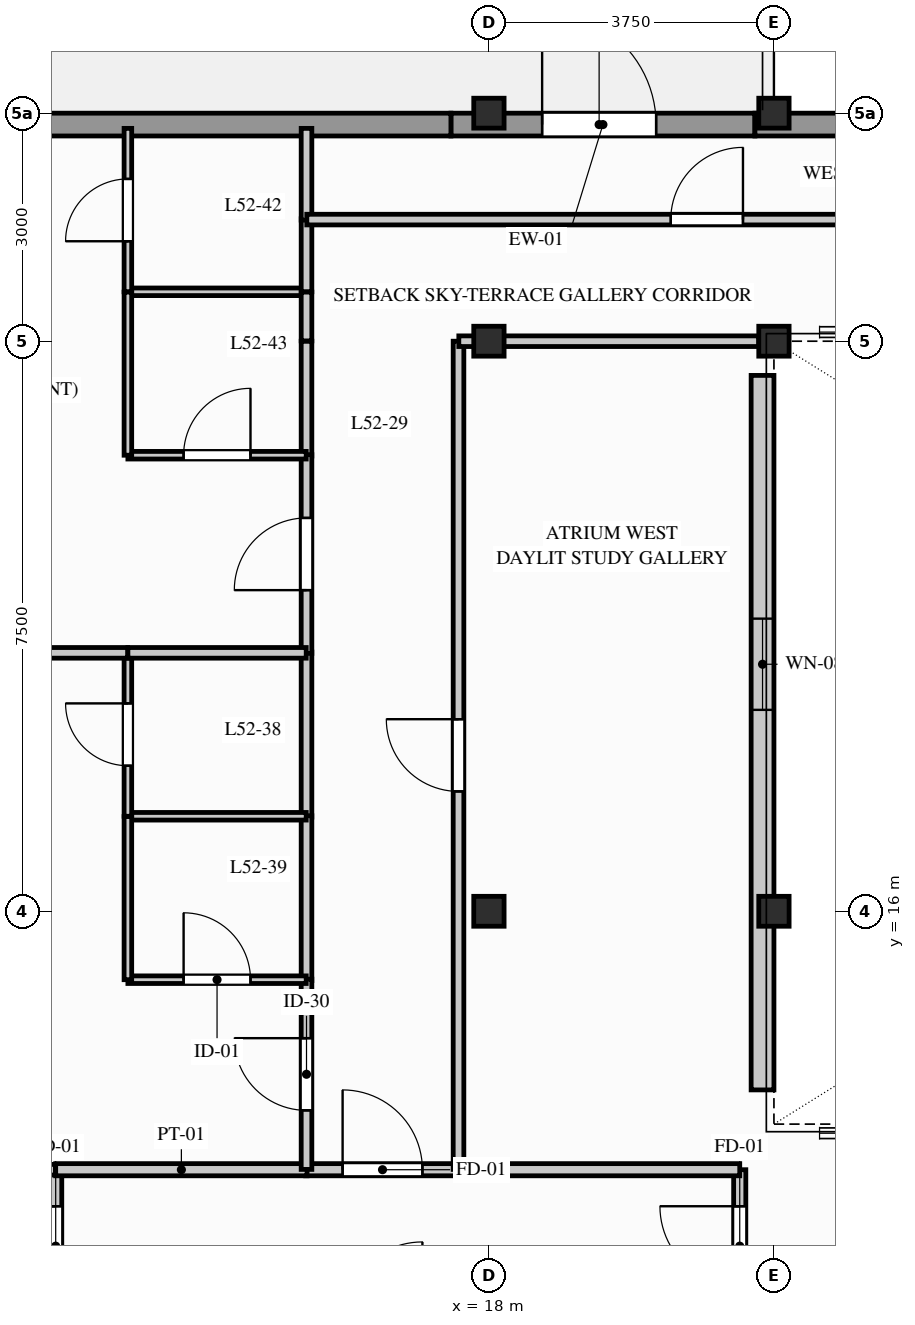
"""IFC4 building model, lengths in metres.
Left out: names, types, materials, properties, quantities, classifications, styles, units other than length and angle.
Written with IfcOpenShell. Run it as: python <this file> out.ifc"""

import sys

from ifc_helpers import new_model, si_unit, direction, frame, frame_2d, origin, origin_2d, place, context, subcontext, project, spatial, rectangle, i_section, extrude, element, fill, save


model = new_model("IFC4")
c1 = context("Model", 3, precision=1e-05, world=origin(), true_north=direction((0.0, 1.0)))
c2 = subcontext(c1, "Body", "Model", "MODEL_VIEW")
j1 = project(units=[si_unit("LENGTHUNIT", "METRE"), si_unit("PLANEANGLEUNIT", "RADIAN")], contexts=[c1])
p1 = place(None, origin())
s1 = spatial("IfcSite", under=j1, at=p1, CompositionType="ELEMENT")
p2 = place(p1, origin())
s2 = spatial("IfcBuilding", under=s1, at=p2, CompositionType="ELEMENT")
p3 = place(p2, frame((0.0, 0.0, 172.8)))
s3 = spatial("IfcBuildingStorey", under=s2, at=p3, CompositionType="ELEMENT", Elevation=172.8)
for number, where, z_axis, x_axis in (
    (1, (18.0, 16.0, 0.0), (0.0, 0.0, 1.0), (1.0, 0.0, 0.0)),
    (2, (18.0, 23.5, 0.0), (0.0, 0.0, 1.0), (1.0, 0.0, 0.0)),
    (3, (18.0, 26.5, 0.0), (0.0, 0.0, 1.0), (1.0, 0.0, 0.0)),
    (4, (21.75, 16.0, 0.0), (0.0, 0.0, 1.0), (1.0, 0.0, 0.0)),
    (5, (21.75, 23.5, 0.0), (0.0, 0.0, 1.0), (1.0, 0.0, 0.0)),
    (6, (21.75, 26.5, 0.0), (0.0, 0.0, 1.0), (1.0, 0.0, 0.0)),
):
    element("IfcColumn", number, at=place(p3, frame(where, z_axis=z_axis, x_axis=x_axis)), inside=s3, PredefinedType="COLUMN", context=c2, shape_type="SweptSolid", body=[
        extrude(i_section(OverallWidth=0.399, OverallDepth=0.394, WebThickness=0.023, FlangeThickness=0.037, FilletRadius=0.015, at=origin_2d()), origin(), (0.0, 0.0, 1.0), 3.1),
    ])
p4 = place(p3, frame((17.5, 26.35, 0.0), z_axis=(0.0, 0.0, 1.0), x_axis=(1.0, 0.0, 0.0)))
e7 = element("IfcWall", 7, at=p4, inside=s3, PredefinedType="STANDARD", context=c2, shape_type="SweptSolid", body=[
    extrude(rectangle(XDim=4.0, YDim=0.3, at=frame_2d((2.0, 0.0))), origin(), (0.0, 0.0, 1.0), 2.332),
])
p5 = place(p4, frame((1.2, 0.0, 0.0)))
e8 = element("IfcOpeningElement", 8, at=p5, cuts=e7, PredefinedType="OPENING", context=c2, shape_type="SweptSolid", body=[
    extrude(rectangle(XDim=1.5, YDim=2.2, at=frame_2d((0.75, 1.1))), frame((0.0, 0.16, 0.0), z_axis=(0.0, -1.0, 0.0), x_axis=(1.0, 0.0, 0.0)), (0.0, 0.0, 1.0), 0.32),
])
p6 = place(p3, frame((11.45, 26.35, 0.0), z_axis=(0.0, 0.0, 1.0), x_axis=(1.0, 0.0, 0.0)))
e9 = element("IfcWall", 9, at=p6, inside=s3, PredefinedType="STANDARD", context=c2, shape_type="SweptSolid", body=[
    extrude(rectangle(XDim=6.05, YDim=0.3, at=frame_2d((3.025, 0.0))), origin(), (0.0, 0.0, 1.0), 2.332),
])
p7 = place(p3, frame((21.5, 26.35, 0.0), z_axis=(0.0, 0.0, 1.0), x_axis=(1.0, 0.0, 0.0)))
e10 = element("IfcWall", 10, at=p7, inside=s3, PredefinedType="STANDARD", context=c2, shape_type="SweptSolid", body=[
    extrude(rectangle(XDim=6.3, YDim=0.3, at=frame_2d((3.15, 0.0))), origin(), (0.0, 0.0, 1.0), 2.332),
])
p8 = place(p3, frame((21.6, 23.05, 0.0), z_axis=(0.0, 0.0, 1.0), x_axis=(0.0, -1.0, 0.0)))
e11 = element("IfcWall", 11, at=p8, inside=s3, PredefinedType="STANDARD", context=c2, shape_type="SweptSolid", body=[
    extrude(rectangle(XDim=9.4, YDim=0.3, at=frame_2d((4.7, 0.0))), origin(), (0.0, 0.0, 1.0), 2.253),
])
p9 = place(p8, frame((3.2, 0.0, 0.433)))
e12 = element("IfcOpeningElement", 12, at=p9, cuts=e11, PredefinedType="OPENING", context=c2, shape_type="SweptSolid", body=[
    extrude(rectangle(XDim=1.2, YDim=1.6, at=frame_2d((0.6, 0.8))), frame((0.0, 0.16, 0.0), z_axis=(0.0, -1.0, 0.0), x_axis=(1.0, 0.0, 0.0)), (0.0, 0.0, 1.0), 0.32),
])
p10 = place(p3, frame((21.3, 10.589, 0.0), z_axis=(0.0, 0.0, 1.0), x_axis=(0.0, 1.0, 0.0)))
e13 = element("IfcWall", 13, at=p10, inside=s3, PredefinedType="PARTITIONING", context=c2, shape_type="SweptSolid", body=[
    extrude(rectangle(XDim=2.011, YDim=0.16, at=frame_2d((1.006, 0.0))), origin(), (0.0, 0.0, 1.0), 2.89),
])
p11 = place(p10, frame((0.481, 0.0, 0.0)))
e14 = element("IfcOpeningElement", 14, at=p11, cuts=e13, PredefinedType="OPENING", context=c2, shape_type="SweptSolid", body=[
    extrude(rectangle(XDim=1.05, YDim=2.06, at=frame_2d((0.525, 1.03))), frame((0.0, 0.09, 0.0), z_axis=(0.0, -1.0, 0.0), x_axis=(1.0, 0.0, 0.0)), (0.0, 0.0, 1.0), 0.18),
])
p12 = place(p3, frame((15.589, 12.6, 0.0), z_axis=(0.0, 0.0, 1.0), x_axis=(1.0, 0.0, 0.0)))
e15 = element("IfcWall", 15, at=p12, inside=s3, PredefinedType="PARTITIONING", context=c2, shape_type="SweptSolid", body=[
    extrude(rectangle(XDim=2.023, YDim=0.16, at=frame_2d((1.011, 0.0))), origin(), (0.0, 0.0, 1.0), 2.89),
])
p13 = place(p12, frame((0.486, 0.0, 0.0)))
e16 = element("IfcOpeningElement", 16, at=p13, cuts=e15, PredefinedType="OPENING", context=c2, shape_type="SweptSolid", body=[
    extrude(rectangle(XDim=1.05, YDim=2.06, at=frame_2d((0.525, 1.03))), frame((0.0, 0.09, 0.0), z_axis=(0.0, -1.0, 0.0), x_axis=(1.0, 0.0, 0.0)), (0.0, 0.0, 1.0), 0.18),
])
p14 = place(p3, frame((12.3, 10.589, 0.0), z_axis=(0.0, 0.0, 1.0), x_axis=(0.0, 1.0, 0.0)))
e17 = element("IfcWall", 17, at=p14, inside=s3, PredefinedType="PARTITIONING", context=c2, shape_type="SweptSolid", body=[
    extrude(rectangle(XDim=2.011, YDim=0.16, at=frame_2d((1.006, 0.0))), origin(), (0.0, 0.0, 1.0), 2.89),
])
p15 = place(p14, frame((0.481, 0.0, 0.0)))
e18 = element("IfcOpeningElement", 18, at=p15, cuts=e17, PredefinedType="OPENING", context=c2, shape_type="SweptSolid", body=[
    extrude(rectangle(XDim=1.05, YDim=2.06, at=frame_2d((0.525, 1.03))), frame((0.0, 0.09, 0.0), z_axis=(0.0, -1.0, 0.0), x_axis=(1.0, 0.0, 0.0)), (0.0, 0.0, 1.0), 0.18),
])
p16 = place(p3, frame((12.3, 12.6, 0.0), z_axis=(0.0, 0.0, 1.0), x_axis=(1.0, 0.0, 0.0)))
e19 = element("IfcWall", 19, at=p16, inside=s3, PredefinedType="PARTITIONING", context=c2, shape_type="SweptSolid", body=[
    extrude(rectangle(XDim=3.307, YDim=0.16, at=frame_2d((1.654, 0.0))), origin(), (0.0, 0.0, 1.0), 2.89),
])
p17 = place(p3, frame((17.593, 12.6, 0.0), z_axis=(0.0, 0.0, 1.0), x_axis=(1.0, 0.0, 0.0)))
e20 = element("IfcWall", 20, at=p17, inside=s3, PredefinedType="PARTITIONING", context=c2, shape_type="SweptSolid", body=[
    extrude(rectangle(XDim=3.707, YDim=0.16, at=frame_2d((1.854, 0.0))), origin(), (0.0, 0.0, 1.0), 2.253),
])
p18 = place(p3, frame((15.6, 17.239, 0.0), z_axis=(0.0, 0.0, 1.0), x_axis=(0.0, 1.0, 0.0)))
e21 = element("IfcWall", 21, at=p18, inside=s3, PredefinedType="PARTITIONING", context=c2, shape_type="SweptSolid", body=[
    extrude(rectangle(XDim=2.173, YDim=0.14, at=frame_2d((1.086, 0.0))), origin(), (0.0, 0.0, 1.0), 2.89),
])
p19 = place(p3, frame((15.6, 15.089, 0.0), z_axis=(0.0, 0.0, 1.0), x_axis=(0.0, 1.0, 0.0)))
e22 = element("IfcWall", 22, at=p19, inside=s3, PredefinedType="PARTITIONING", context=c2, shape_type="SweptSolid", body=[
    extrude(rectangle(XDim=2.169, YDim=0.14, at=frame_2d((1.084, 0.0))), origin(), (0.0, 0.0, 1.0), 2.253),
])
p20 = place(p3, frame((15.6, 12.604, 0.0), z_axis=(0.0, 0.0, 1.0), x_axis=(0.0, 1.0, 0.0)))
e23 = element("IfcWall", 23, at=p20, inside=s3, PredefinedType="PARTITIONING", context=c2, shape_type="SweptSolid", body=[
    extrude(rectangle(XDim=2.503, YDim=0.14, at=frame_2d((1.252, 0.0))), origin(), (0.0, 0.0, 1.0), 2.89),
])
p21 = place(p20, frame((0.777, 0.0, 0.0)))
e24 = element("IfcOpeningElement", 24, at=p21, cuts=e23, PredefinedType="OPENING", context=c2, shape_type="SweptSolid", body=[
    extrude(rectangle(XDim=0.95, YDim=2.05, at=frame_2d((0.475, 1.025))), frame((0.0, 0.08, 0.0), z_axis=(0.0, -1.0, 0.0), x_axis=(1.0, 0.0, 0.0)), (0.0, 0.0, 1.0), 0.16),
])
p22 = place(p3, frame((15.6, 21.989, 0.0), z_axis=(0.0, 0.0, 1.0), x_axis=(0.0, 1.0, 0.0)))
e25 = element("IfcWall", 25, at=p22, inside=s3, PredefinedType="PARTITIONING", context=c2, shape_type="SweptSolid", body=[
    extrude(rectangle(XDim=1.511, YDim=0.14, at=frame_2d((0.756, 0.0))), origin(), (0.0, 0.0, 1.0), 2.253),
])
p23 = place(p3, frame((15.6, 19.393, 0.0), z_axis=(0.0, 0.0, 1.0), x_axis=(0.0, 1.0, 0.0)))
e26 = element("IfcWall", 26, at=p23, inside=s3, PredefinedType="PARTITIONING", context=c2, shape_type="SweptSolid", body=[
    extrude(rectangle(XDim=2.615, YDim=0.14, at=frame_2d((1.307, 0.0))), origin(), (0.0, 0.0, 1.0), 2.562),
])
p24 = place(p23, frame((0.832, 0.0, 0.0)))
e27 = element("IfcOpeningElement", 27, at=p24, cuts=e26, PredefinedType="OPENING", context=c2, shape_type="SweptSolid", body=[
    extrude(rectangle(XDim=0.95, YDim=2.05, at=frame_2d((0.475, 1.025))), frame((0.0, 0.08, 0.0), z_axis=(0.0, -1.0, 0.0), x_axis=(1.0, 0.0, 0.0)), (0.0, 0.0, 1.0), 0.16),
])
p25 = place(p3, frame((17.6, 12.604, 0.0), z_axis=(0.0, 0.0, 1.0), x_axis=(0.0, 1.0, 0.0)))
e28 = element("IfcWall", 28, at=p25, inside=s3, PredefinedType="PARTITIONING", context=c2, shape_type="SweptSolid", body=[
    extrude(rectangle(XDim=10.896, YDim=0.14, at=frame_2d((5.448, 0.0))), origin(), (0.0, 0.0, 1.0), 2.253),
])
p26 = place(p25, frame((4.973, 0.0, 0.0)))
e29 = element("IfcOpeningElement", 29, at=p26, cuts=e28, PredefinedType="OPENING", context=c2, shape_type="SweptSolid", body=[
    extrude(rectangle(XDim=0.95, YDim=2.05, at=frame_2d((0.475, 1.025))), frame((0.0, 0.08, 0.0), z_axis=(0.0, -1.0, 0.0), x_axis=(1.0, 0.0, 0.0)), (0.0, 0.0, 1.0), 0.16),
])
p27 = place(p3, frame((4.793, 12.6, 0.0), z_axis=(0.0, 0.0, 1.0), x_axis=(1.0, 0.0, 0.0)))
e30 = element("IfcWall", 30, at=p27, inside=s3, PredefinedType="PARTITIONING", context=c2, shape_type="SweptSolid", body=[
    extrude(rectangle(XDim=7.503, YDim=0.14, at=frame_2d((3.751, 0.0))), origin(), (0.0, 0.0, 1.0), 2.253),
])
p28 = place(p3, frame((13.25, 17.25, 0.0), z_axis=(0.0, 0.0, 1.0), x_axis=(1.0, 0.0, 0.0)))
e31 = element("IfcWall", 31, at=p28, inside=s3, PredefinedType="PARTITIONING", context=c2, shape_type="SweptSolid", body=[
    extrude(rectangle(XDim=2.346, YDim=0.1, at=frame_2d((1.173, 0.0))), origin(), (0.0, 0.0, 1.0), 2.89),
])
p29 = place(p3, frame((13.25, 17.25, 0.0), z_axis=(0.0, 0.0, 1.0), x_axis=(0.0, 1.0, 0.0)))
e32 = element("IfcWall", 32, at=p29, inside=s3, PredefinedType="PARTITIONING", context=c2, shape_type="SweptSolid", body=[
    extrude(rectangle(XDim=2.15, YDim=0.1, at=frame_2d((1.075, 0.0))), origin(), (0.0, 0.0, 1.0), 2.89),
])
p30 = place(p29, frame((0.665, 0.0, 0.0)))
e33 = element("IfcOpeningElement", 33, at=p30, cuts=e32, PredefinedType="OPENING", context=c2, shape_type="SweptSolid", body=[
    extrude(rectangle(XDim=0.82, YDim=2.02, at=frame_2d((0.41, 1.01))), frame((0.0, 0.06, 0.0), z_axis=(0.0, -1.0, 0.0), x_axis=(1.0, 0.0, 0.0)), (0.0, 0.0, 1.0), 0.12),
])
p31 = place(p3, frame((13.25, 19.4, 0.0), z_axis=(0.0, 0.0, 1.0), x_axis=(1.0, 0.0, 0.0)))
e34 = element("IfcWall", 34, at=p31, inside=s3, PredefinedType="PARTITIONING", context=c2, shape_type="SweptSolid", body=[
    extrude(rectangle(XDim=2.346, YDim=0.14, at=frame_2d((1.173, 0.0))), origin(), (0.0, 0.0, 1.0), 2.89),
])
p32 = place(p3, frame((13.25, 15.1, 0.0), z_axis=(0.0, 0.0, 1.0), x_axis=(1.0, 0.0, 0.0)))
e35 = element("IfcWall", 35, at=p32, inside=s3, PredefinedType="PARTITIONING", context=c2, shape_type="SweptSolid", body=[
    extrude(rectangle(XDim=2.346, YDim=0.1, at=frame_2d((1.173, 0.0))), origin(), (0.0, 0.0, 1.0), 2.89),
])
p33 = place(p32, frame((0.733, 0.0, 0.0)))
e36 = element("IfcOpeningElement", 36, at=p33, cuts=e35, PredefinedType="OPENING", context=c2, shape_type="SweptSolid", body=[
    extrude(rectangle(XDim=0.88, YDim=2.04, at=frame_2d((0.44, 1.02))), frame((0.0, 0.06, 0.0), z_axis=(0.0, -1.0, 0.0), x_axis=(1.0, 0.0, 0.0)), (0.0, 0.0, 1.0), 0.12),
])
p34 = place(p3, frame((13.25, 15.1, 0.0), z_axis=(0.0, 0.0, 1.0), x_axis=(0.0, 1.0, 0.0)))
e37 = element("IfcWall", 37, at=p34, inside=s3, PredefinedType="PARTITIONING", context=c2, shape_type="SweptSolid", body=[
    extrude(rectangle(XDim=2.146, YDim=0.1, at=frame_2d((1.073, 0.0))), origin(), (0.0, 0.0, 1.0), 2.253),
])
p35 = place(p3, frame((4.793, 19.4, 0.0), z_axis=(0.0, 0.0, 1.0), x_axis=(1.0, 0.0, 0.0)))
e38 = element("IfcWall", 38, at=p35, inside=s3, PredefinedType="PARTITIONING", context=c2, shape_type="SweptSolid", body=[
    extrude(rectangle(XDim=8.453, YDim=0.14, at=frame_2d((4.227, 0.0))), origin(), (0.0, 0.0, 1.0), 2.253),
])
p36 = place(p3, frame((13.25, 24.15, 0.0), z_axis=(0.0, 0.0, 1.0), x_axis=(1.0, 0.0, 0.0)))
e39 = element("IfcWall", 39, at=p36, inside=s3, PredefinedType="PARTITIONING", context=c2, shape_type="SweptSolid", body=[
    extrude(rectangle(XDim=2.35, YDim=0.1, at=frame_2d((1.175, 0.0))), origin(), (0.0, 0.0, 1.0), 2.89),
])
p37 = place(p3, frame((13.25, 24.15, 0.0), z_axis=(0.0, 0.0, 1.0), x_axis=(0.0, 1.0, 0.0)))
e40 = element("IfcWall", 40, at=p37, inside=s3, PredefinedType="PARTITIONING", context=c2, shape_type="SweptSolid", body=[
    extrude(rectangle(XDim=2.15, YDim=0.1, at=frame_2d((1.075, 0.0))), origin(), (0.0, 0.0, 1.0), 2.89),
])
p38 = place(p37, frame((0.665, 0.0, 0.0)))
e41 = element("IfcOpeningElement", 41, at=p38, cuts=e40, PredefinedType="OPENING", context=c2, shape_type="SweptSolid", body=[
    extrude(rectangle(XDim=0.82, YDim=2.02, at=frame_2d((0.41, 1.01))), frame((0.0, 0.06, 0.0), z_axis=(0.0, -1.0, 0.0), x_axis=(1.0, 0.0, 0.0)), (0.0, 0.0, 1.0), 0.12),
])
p39 = place(p3, frame((15.6, 24.15, 0.0), z_axis=(0.0, 0.0, 1.0), x_axis=(0.0, 1.0, 0.0)))
e42 = element("IfcWall", 42, at=p39, inside=s3, PredefinedType="PARTITIONING", context=c2, shape_type="SweptSolid", body=[
    extrude(rectangle(XDim=0.961, YDim=0.14, at=frame_2d((0.481, 0.0))), origin(), (0.0, 0.0, 1.0), 2.89),
])
p40 = place(p3, frame((15.6, 25.093, 0.0), z_axis=(0.0, 0.0, 1.0), x_axis=(0.0, 1.0, 0.0)))
e43 = element("IfcWall", 43, at=p40, inside=s3, PredefinedType="PARTITIONING", context=c2, shape_type="SweptSolid", body=[
    extrude(rectangle(XDim=1.207, YDim=0.14, at=frame_2d((0.604, 0.0))), origin(), (0.0, 0.0, 1.0), 2.89),
])
p41 = place(p3, frame((13.25, 22.0, 0.0), z_axis=(0.0, 0.0, 1.0), x_axis=(1.0, 0.0, 0.0)))
e44 = element("IfcWall", 44, at=p41, inside=s3, PredefinedType="PARTITIONING", context=c2, shape_type="SweptSolid", body=[
    extrude(rectangle(XDim=2.346, YDim=0.1, at=frame_2d((1.173, 0.0))), origin(), (0.0, 0.0, 1.0), 2.89),
])
p42 = place(p41, frame((0.733, 0.0, 0.0)))
e45 = element("IfcOpeningElement", 45, at=p42, cuts=e44, PredefinedType="OPENING", context=c2, shape_type="SweptSolid", body=[
    extrude(rectangle(XDim=0.88, YDim=2.04, at=frame_2d((0.44, 1.02))), frame((0.0, 0.06, 0.0), z_axis=(0.0, -1.0, 0.0), x_axis=(1.0, 0.0, 0.0)), (0.0, 0.0, 1.0), 0.12),
])
p43 = place(p3, frame((13.25, 22.0, 0.0), z_axis=(0.0, 0.0, 1.0), x_axis=(0.0, 1.0, 0.0)))
e46 = element("IfcWall", 46, at=p43, inside=s3, PredefinedType="PARTITIONING", context=c2, shape_type="SweptSolid", body=[
    extrude(rectangle(XDim=2.146, YDim=0.1, at=frame_2d((1.073, 0.0))), origin(), (0.0, 0.0, 1.0), 2.253),
])
p44 = place(p3, frame((15.6, 23.504, 0.0), z_axis=(0.0, 0.0, 1.0), x_axis=(0.0, 1.0, 0.0)))
e47 = element("IfcWall", 47, at=p44, inside=s3, PredefinedType="PARTITIONING", context=c2, shape_type="SweptSolid", body=[
    extrude(rectangle(XDim=0.642, YDim=0.14, at=frame_2d((0.321, 0.0))), origin(), (0.0, 0.0, 1.0), 2.253),
])
p45 = place(p3, frame((17.604, 23.5, 0.0), z_axis=(0.0, 0.0, 1.0), x_axis=(1.0, 0.0, 0.0)))
e48 = element("IfcWall", 48, at=p45, inside=s3, PredefinedType="PARTITIONING", context=c2, shape_type="SweptSolid", body=[
    extrude(rectangle(XDim=3.946, YDim=0.14, at=frame_2d((1.973, 0.0))), origin(), (0.0, 0.0, 1.0), 2.253),
])
p46 = place(p3, frame((15.604, 25.1, 0.0), z_axis=(0.0, 0.0, 1.0), x_axis=(1.0, 0.0, 0.0)))
e49 = element("IfcWall", 49, at=p46, inside=s3, PredefinedType="PARTITIONING", context=c2, shape_type="SweptSolid", body=[
    extrude(rectangle(XDim=11.407, YDim=0.14, at=frame_2d((5.704, 0.0))), origin(), (0.0, 0.0, 1.0), 2.253),
])
p47 = place(p46, frame((4.789, 0.0, 0.0)))
e50 = element("IfcOpeningElement", 50, at=p47, cuts=e49, PredefinedType="OPENING", context=c2, shape_type="SweptSolid", body=[
    extrude(rectangle(XDim=0.95, YDim=2.05, at=frame_2d((0.475, 1.025))), frame((0.0, 0.08, 0.0), z_axis=(0.0, -1.0, 0.0), x_axis=(1.0, 0.0, 0.0)), (0.0, 0.0, 1.0), 0.16),
])
p48 = place(p5, origin())
e51 = element("IfcDoor", 51, at=p48, inside=s3, OperationType="SINGLE_SWING_LEFT", PredefinedType="DOOR", context=c2, shape_type="SweptSolid", body=[
    extrude(rectangle(XDim=1.5, YDim=2.2, at=frame_2d((0.75, 1.1))), frame((0.0, 0.025, 0.0), z_axis=(0.0, -1.0, 0.0), x_axis=(1.0, 0.0, 0.0)), (0.0, 0.0, 1.0), 0.05),
])
fill(e8, e51)
p49 = place(p9, origin())
e52 = element("IfcWindow", 52, at=p49, inside=s3, PartitioningType="SINGLE_PANEL", PredefinedType="WINDOW", context=c2, shape_type="SweptSolid", body=[
    extrude(rectangle(XDim=1.2, YDim=1.6, at=frame_2d((0.6, 0.8))), frame((0.0, 0.03, 0.0), z_axis=(0.0, -1.0, 0.0), x_axis=(1.0, 0.0, 0.0)), (0.0, 0.0, 1.0), 0.06),
])
fill(e12, e52)
p50 = place(p11, origin())
e53 = element("IfcDoor", 53, at=p50, inside=s3, OperationType="SINGLE_SWING_RIGHT", PredefinedType="DOOR", context=c2, shape_type="SweptSolid", body=[
    extrude(rectangle(XDim=1.05, YDim=2.06, at=frame_2d((0.525, 1.03))), frame((0.0, 0.025, 0.0), z_axis=(0.0, -1.0, 0.0), x_axis=(1.0, 0.0, 0.0)), (0.0, 0.0, 1.0), 0.05),
])
fill(e14, e53)
p51 = place(p13, origin())
e54 = element("IfcDoor", 54, at=p51, inside=s3, OperationType="SINGLE_SWING_LEFT", PredefinedType="DOOR", context=c2, shape_type="SweptSolid", body=[
    extrude(rectangle(XDim=1.05, YDim=2.06, at=frame_2d((0.525, 1.03))), frame((0.0, 0.025, 0.0), z_axis=(0.0, -1.0, 0.0), x_axis=(1.0, 0.0, 0.0)), (0.0, 0.0, 1.0), 0.05),
])
fill(e16, e54)
p52 = place(p15, origin())
e55 = element("IfcDoor", 55, at=p52, inside=s3, OperationType="SINGLE_SWING_RIGHT", PredefinedType="DOOR", context=c2, shape_type="SweptSolid", body=[
    extrude(rectangle(XDim=1.05, YDim=2.06, at=frame_2d((0.525, 1.03))), frame((0.0, 0.025, 0.0), z_axis=(0.0, -1.0, 0.0), x_axis=(1.0, 0.0, 0.0)), (0.0, 0.0, 1.0), 0.05),
])
fill(e18, e55)
p53 = place(p21, origin())
e56 = element("IfcDoor", 56, at=p53, inside=s3, OperationType="SINGLE_SWING_RIGHT", PredefinedType="DOOR", context=c2, shape_type="SweptSolid", body=[
    extrude(rectangle(XDim=0.95, YDim=2.05, at=frame_2d((0.475, 1.025))), frame((0.0, 0.025, 0.0), z_axis=(0.0, -1.0, 0.0), x_axis=(1.0, 0.0, 0.0)), (0.0, 0.0, 1.0), 0.05),
])
fill(e24, e56)
p54 = place(p24, origin())
e57 = element("IfcDoor", 57, at=p54, inside=s3, OperationType="SINGLE_SWING_LEFT", PredefinedType="DOOR", context=c2, shape_type="SweptSolid", body=[
    extrude(rectangle(XDim=0.95, YDim=2.05, at=frame_2d((0.475, 1.025))), frame((0.0, 0.025, 0.0), z_axis=(0.0, -1.0, 0.0), x_axis=(1.0, 0.0, 0.0)), (0.0, 0.0, 1.0), 0.05),
])
fill(e27, e57)
p55 = place(p26, origin())
e58 = element("IfcDoor", 58, at=p55, inside=s3, OperationType="SINGLE_SWING_RIGHT", PredefinedType="DOOR", context=c2, shape_type="SweptSolid", body=[
    extrude(rectangle(XDim=0.95, YDim=2.05, at=frame_2d((0.475, 1.025))), frame((0.0, 0.025, 0.0), z_axis=(0.0, -1.0, 0.0), x_axis=(1.0, 0.0, 0.0)), (0.0, 0.0, 1.0), 0.05),
])
fill(e29, e58)
p56 = place(p30, origin())
e59 = element("IfcDoor", 59, at=p56, inside=s3, OperationType="SINGLE_SWING_RIGHT", PredefinedType="DOOR", context=c2, shape_type="SweptSolid", body=[
    extrude(rectangle(XDim=0.82, YDim=2.02, at=frame_2d((0.41, 1.01))), frame((0.0, 0.025, 0.0), z_axis=(0.0, -1.0, 0.0), x_axis=(1.0, 0.0, 0.0)), (0.0, 0.0, 1.0), 0.05),
])
fill(e33, e59)
p57 = place(p33, origin())
e60 = element("IfcDoor", 60, at=p57, inside=s3, OperationType="SINGLE_SWING_LEFT", PredefinedType="DOOR", context=c2, shape_type="SweptSolid", body=[
    extrude(rectangle(XDim=0.88, YDim=2.04, at=frame_2d((0.44, 1.02))), frame((0.0, 0.025, 0.0), z_axis=(0.0, -1.0, 0.0), x_axis=(1.0, 0.0, 0.0)), (0.0, 0.0, 1.0), 0.05),
])
fill(e36, e60)
p58 = place(p38, origin())
e61 = element("IfcDoor", 61, at=p58, inside=s3, OperationType="SINGLE_SWING_LEFT", PredefinedType="DOOR", context=c2, shape_type="SweptSolid", body=[
    extrude(rectangle(XDim=0.82, YDim=2.02, at=frame_2d((0.41, 1.01))), frame((0.0, 0.025, 0.0), z_axis=(0.0, -1.0, 0.0), x_axis=(1.0, 0.0, 0.0)), (0.0, 0.0, 1.0), 0.05),
])
fill(e41, e61)
p59 = place(p42, origin())
e62 = element("IfcDoor", 62, at=p59, inside=s3, OperationType="SINGLE_SWING_RIGHT", PredefinedType="DOOR", context=c2, shape_type="SweptSolid", body=[
    extrude(rectangle(XDim=0.88, YDim=2.04, at=frame_2d((0.44, 1.02))), frame((0.0, 0.025, 0.0), z_axis=(0.0, -1.0, 0.0), x_axis=(1.0, 0.0, 0.0)), (0.0, 0.0, 1.0), 0.05),
])
fill(e45, e62)
p60 = place(p47, origin())
e63 = element("IfcDoor", 63, at=p60, inside=s3, OperationType="SINGLE_SWING_RIGHT", PredefinedType="DOOR", context=c2, shape_type="SweptSolid", body=[
    extrude(rectangle(XDim=0.95, YDim=2.05, at=frame_2d((0.475, 1.025))), frame((0.0, 0.025, 0.0), z_axis=(0.0, -1.0, 0.0), x_axis=(1.0, 0.0, 0.0)), (0.0, 0.0, 1.0), 0.05),
])
fill(e50, e63)
save(model, sys.argv[1])
